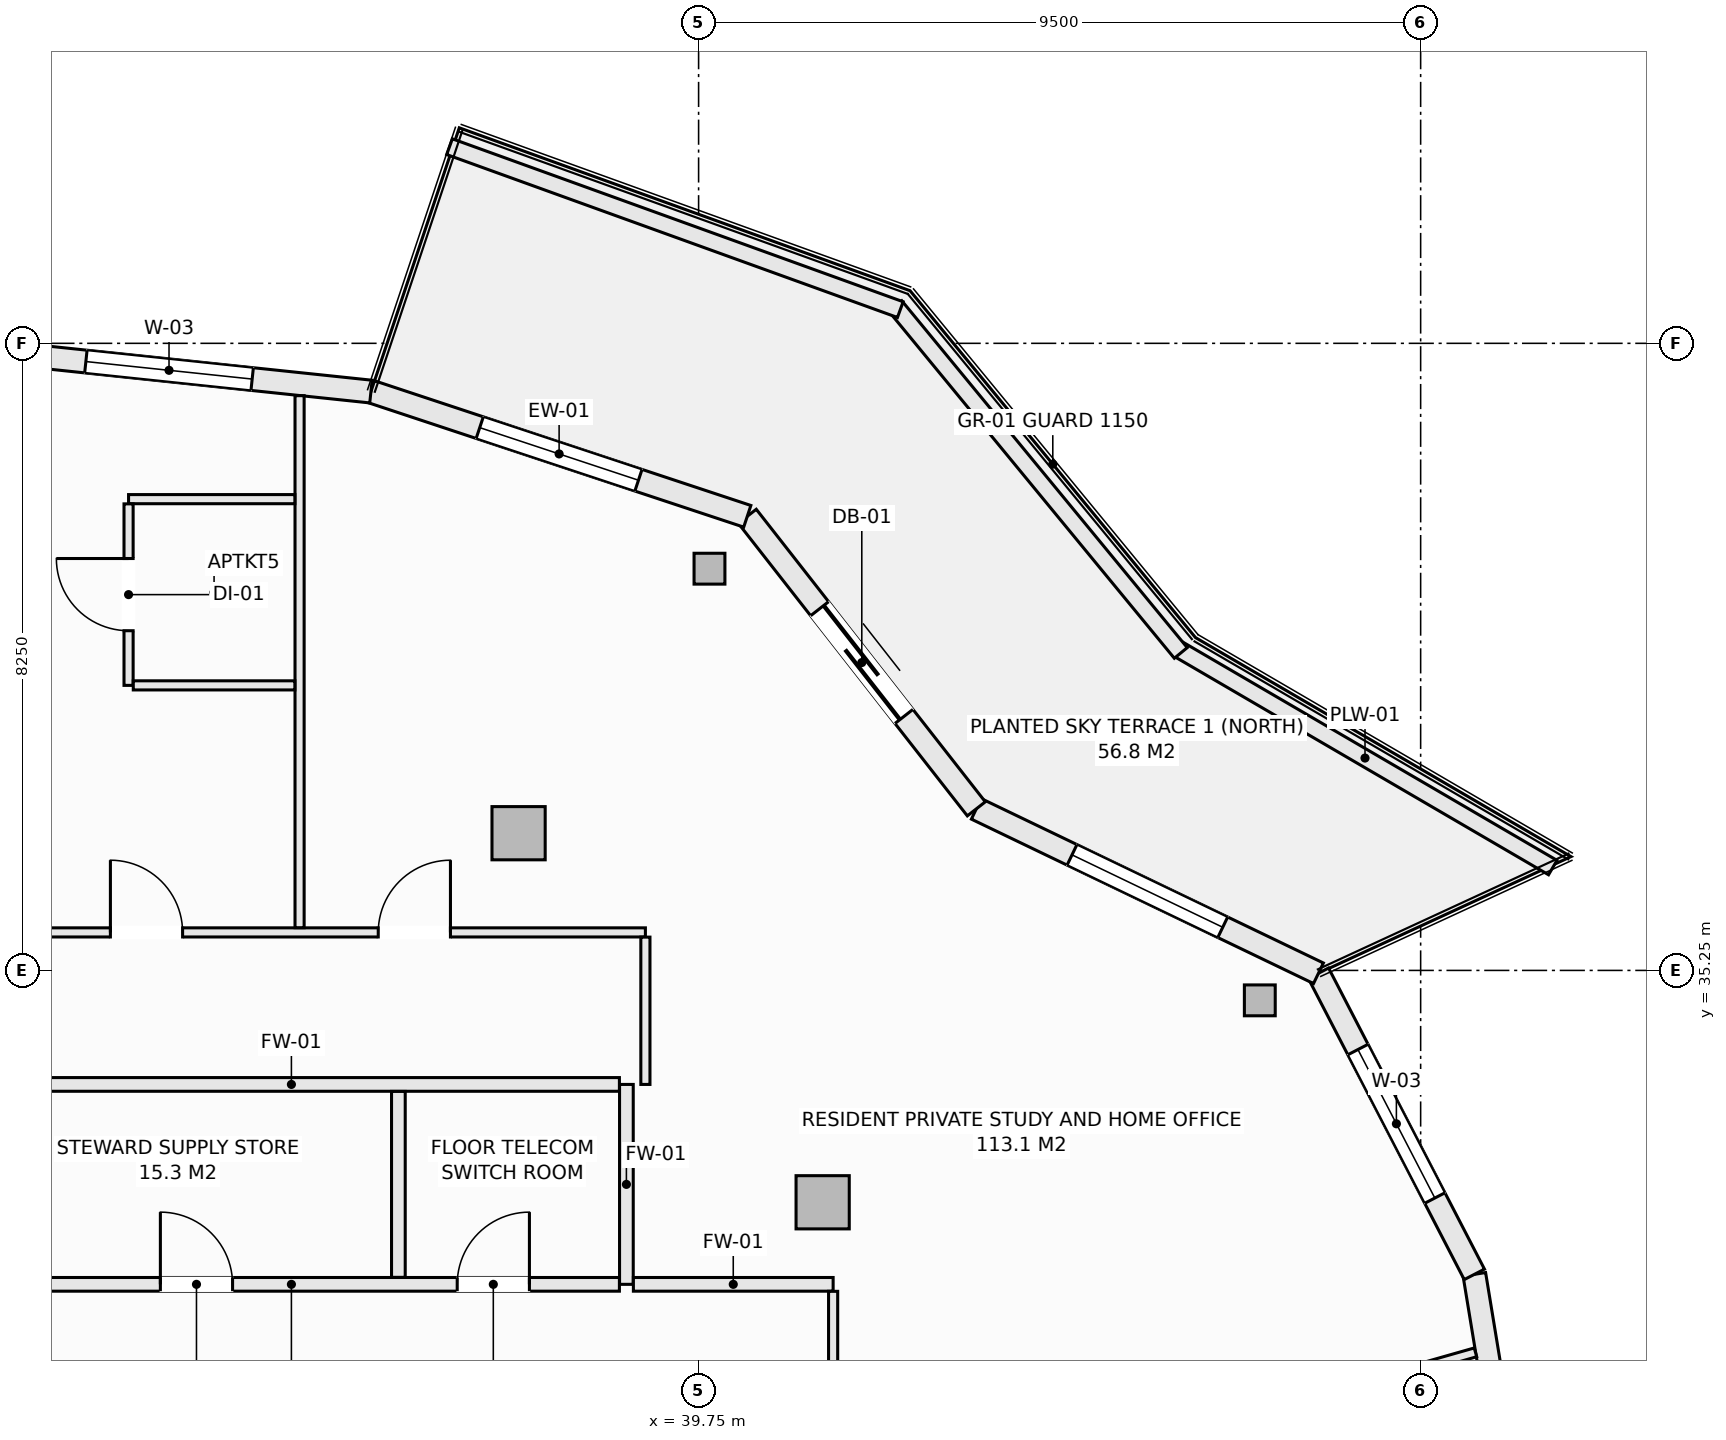
"""IFC4 building model, lengths in metres.
Left out: names, types, materials, properties, quantities, classifications, styles, units other than length and angle.
Written with IfcOpenShell. Run it as: python <this file> out.ifc"""

import sys

from ifc_helpers import new_model, si_unit, direction, frame, frame_2d, origin, origin_2d, place, context, subcontext, project, spatial, rectangle, hollow_rectangle, extrude, element, fill, save


model = new_model("IFC4")
c1 = context("Model", 3, precision=1e-05, world=origin(), true_north=direction((0.0, 1.0)))
c2 = subcontext(c1, "Body", "Model", "MODEL_VIEW")
j1 = project(units=[si_unit("LENGTHUNIT", "METRE"), si_unit("PLANEANGLEUNIT", "RADIAN")], contexts=[c1])
p1 = place(None, origin())
s1 = spatial("IfcSite", under=j1, at=p1, CompositionType="ELEMENT")
p2 = place(p1, origin())
s2 = spatial("IfcBuilding", under=s1, at=p2, CompositionType="ELEMENT")
p3 = place(p2, frame((0.0, 0.0, 265.7)))
s3 = spatial("IfcBuildingStorey", under=s2, at=p3, CompositionType="ELEMENT", Elevation=265.7)
for number, where, z_axis, x_axis in (
    (1, (47.134, 34.856, -0.27), (0.0, 0.0, 1.0), (1.0, 0.0, 0.0)),
    (2, (39.893, 40.535, -0.27), (0.0, 0.0, 1.0), (1.0, 0.0, 0.0)),
):
    element("IfcColumn", number, at=place(p3, frame(where, z_axis=z_axis, x_axis=x_axis)), inside=s3, PredefinedType="COLUMN", context=c2, shape_type="SweptSolid", body=[
        extrude(hollow_rectangle(XDim=0.406, YDim=0.406, WallThickness=0.016, at=origin_2d()), origin(), (0.0, 0.0, 1.0), 3.3),
    ])
for number, where, z_axis, x_axis in (
    (3, (41.382, 32.199, -0.27), (0.0, 0.0, 1.0), (1.0, 0.0, 0.0)),
    (4, (37.382, 37.055, -0.27), (0.0, 0.0, 1.0), (1.0, 0.0, 0.0)),
):
    element("IfcColumn", number, at=place(p3, frame(where, z_axis=z_axis, x_axis=x_axis)), inside=s3, PredefinedType="COLUMN", context=c2, shape_type="SweptSolid", body=[
        extrude(rectangle(XDim=0.7, YDim=0.7, at=origin_2d()), origin(), (0.0, 0.0, 1.0), 3.3),
    ])
p4 = place(p3, frame((49.957, 31.251, 0.0), z_axis=(0.0, 0.0, 1.0), x_axis=(0.162404622434, -0.98672424649, 0.0)))
e5 = element("IfcWall", 5, at=p4, inside=s3, PredefinedType="SOLIDWALL", context=c2, shape_type="SweptSolid", body=[
    extrude(rectangle(XDim=4.308, YDim=0.3, at=frame_2d((2.154, 0.0))), origin(), (0.0, 0.0, 1.0), 2.605),
])
p5 = place(p4, frame((1.554, 0.0, 0.72)))
e6 = element("IfcOpeningElement", 6, at=p5, cuts=e5, PredefinedType="OPENING", context=c2, shape_type="SweptSolid", body=[
    extrude(rectangle(XDim=1.2, YDim=1.65, at=frame_2d((0.6, 0.825))), frame((0.0, 0.16, 0.0), z_axis=(0.0, -1.0, 0.0), x_axis=(1.0, 0.0, 0.0)), (0.0, 0.0, 1.0), 0.32),
])
p6 = place(p3, frame((47.906, 35.212, 0.0), z_axis=(0.0, 0.0, 1.0), x_axis=(0.459801070243, -0.888021945564, 0.0)))
e7 = element("IfcWall", 7, at=p6, inside=s3, PredefinedType="SOLIDWALL", context=c2, shape_type="SweptSolid", body=[
    extrude(rectangle(XDim=4.461, YDim=0.3, at=frame_2d((2.23, 0.0))), origin(), (0.0, 0.0, 1.0), 2.605),
])
p7 = place(p6, frame((1.13, 0.0, 0.72)))
e8 = element("IfcOpeningElement", 8, at=p7, cuts=e7, PredefinedType="OPENING", context=c2, shape_type="SweptSolid", body=[
    extrude(rectangle(XDim=2.2, YDim=1.65, at=frame_2d((1.1, 0.825))), frame((0.0, 0.16, 0.0), z_axis=(0.0, -1.0, 0.0), x_axis=(1.0, 0.0, 0.0)), (0.0, 0.0, 1.0), 0.32),
])
p8 = place(p3, frame((43.404, 37.375, 0.0), z_axis=(0.0, 0.0, 1.0), x_axis=(0.901346013132, -0.433099716706, 0.0)))
e9 = element("IfcWall", 9, at=p8, inside=s3, PredefinedType="SOLIDWALL", context=c2, shape_type="SweptSolid", body=[
    extrude(rectangle(XDim=4.994, YDim=0.3, at=frame_2d((2.497, 0.0))), origin(), (0.0, 0.0, 1.0), 2.605),
])
p9 = place(p8, frame((1.397, 0.0, 0.72)))
e10 = element("IfcOpeningElement", 10, at=p9, cuts=e9, PredefinedType="OPENING", context=c2, shape_type="SweptSolid", body=[
    extrude(rectangle(XDim=2.2, YDim=1.65, at=frame_2d((1.1, 0.825))), frame((0.0, 0.16, 0.0), z_axis=(0.0, -1.0, 0.0), x_axis=(1.0, 0.0, 0.0)), (0.0, 0.0, 1.0), 0.32),
])
p10 = place(p3, frame((40.391, 41.225, 0.0), z_axis=(0.0, 0.0, 1.0), x_axis=(0.616413297421, -0.78742278781, 0.0)))
e11 = element("IfcWall", 11, at=p10, inside=s3, PredefinedType="SOLIDWALL", context=c2, shape_type="SweptSolid", body=[
    extrude(rectangle(XDim=4.888, YDim=0.3, at=frame_2d((2.444, 0.0))), origin(), (0.0, 0.0, 1.0), 2.605),
])
p11 = place(p10, frame((1.544, 0.0, 0.0)))
e12 = element("IfcOpeningElement", 12, at=p11, cuts=e11, PredefinedType="OPENING", context=c2, shape_type="SweptSolid", body=[
    extrude(rectangle(XDim=1.8, YDim=2.25, at=frame_2d((0.9, 1.125))), frame((0.0, 0.16, 0.0), z_axis=(0.0, -1.0, 0.0), x_axis=(1.0, 0.0, 0.0)), (0.0, 0.0, 1.0), 0.32),
])
p12 = place(p3, frame((35.439, 42.865, 0.0), z_axis=(0.0, 0.0, 1.0), x_axis=(0.949252744709, -0.314514271001, 0.0)))
e13 = element("IfcWall", 13, at=p12, inside=s3, PredefinedType="SOLIDWALL", context=c2, shape_type="SweptSolid", body=[
    extrude(rectangle(XDim=5.216, YDim=0.3, at=frame_2d((2.608, 0.0))), origin(), (0.0, 0.0, 1.0), 2.605),
])
p13 = place(p12, frame((1.508, 0.0, 0.72)))
e14 = element("IfcOpeningElement", 14, at=p13, cuts=e13, PredefinedType="OPENING", context=c2, shape_type="SweptSolid", body=[
    extrude(rectangle(XDim=2.2, YDim=1.65, at=frame_2d((1.1, 0.825))), frame((0.0, 0.16, 0.0), z_axis=(0.0, -1.0, 0.0), x_axis=(1.0, 0.0, 0.0)), (0.0, 0.0, 1.0), 0.32),
])
p14 = place(p3, frame((30.125, 43.425, 0.0), z_axis=(0.0, 0.0, 1.0), x_axis=(0.9944966869, -0.104768028258, 0.0)))
e15 = element("IfcWall", 15, at=p14, inside=s3, PredefinedType="SOLIDWALL", context=c2, shape_type="SweptSolid", body=[
    extrude(rectangle(XDim=5.343, YDim=0.3, at=frame_2d((2.672, 0.0))), origin(), (0.0, 0.0, 1.0), 2.605),
])
p15 = place(p14, frame((1.572, 0.0, 0.72)))
e16 = element("IfcOpeningElement", 16, at=p15, cuts=e15, PredefinedType="OPENING", context=c2, shape_type="SweptSolid", body=[
    extrude(rectangle(XDim=2.2, YDim=1.65, at=frame_2d((1.1, 0.825))), frame((0.0, 0.16, 0.0), z_axis=(0.0, -1.0, 0.0), x_axis=(1.0, 0.0, 0.0)), (0.0, 0.0, 1.0), 0.32),
])
p16 = place(p3, frame((46.048, 39.485, 0.0), z_axis=(0.0, 0.0, 1.0), x_axis=(0.863803671285, -0.503828559606, 0.0)))
e17 = element("IfcWall", 17, at=p16, inside=s3, PredefinedType="PARAPET", context=c2, shape_type="SweptSolid", body=[
    extrude(rectangle(XDim=5.719, YDim=0.22, at=frame_2d((2.86, 0.0))), origin(), (0.0, 0.0, 1.0), 0.52),
])
p17 = place(p3, frame((42.339, 43.99, 0.0), z_axis=(0.0, 0.0, 1.0), x_axis=(0.635450933862, -0.772141250455, 0.0)))
e18 = element("IfcWall", 18, at=p17, inside=s3, PredefinedType="PARAPET", context=c2, shape_type="SweptSolid", body=[
    extrude(rectangle(XDim=5.91, YDim=0.22, at=frame_2d((2.955, 0.0))), origin(), (0.0, 0.0, 1.0), 0.52),
])
p18 = place(p3, frame((36.473, 46.087, 0.0), z_axis=(0.0, 0.0, 1.0), x_axis=(0.940465240036, -0.339889882585, 0.0)))
e19 = element("IfcWall", 19, at=p18, inside=s3, PredefinedType="PARAPET", context=c2, shape_type="SweptSolid", body=[
    extrude(rectangle(XDim=6.307, YDim=0.22, at=frame_2d((3.153, 0.0))), origin(), (0.0, 0.0, 1.0), 0.52),
])
p19 = place(p3, frame((38.8, 31.12, 0.0), z_axis=(0.0, 0.0, 1.0), x_axis=(0.0, 1.0, 0.0)))
e20 = element("IfcWall", 20, at=p19, inside=s3, PredefinedType="SOLIDWALL", context=c2, shape_type="SweptSolid", body=[
    extrude(rectangle(XDim=2.63, YDim=0.18, at=frame_2d((1.315, 0.0))), origin(), (0.0, 0.0, 1.0), 3.03),
])
p20 = place(p3, frame((30.077, 31.12, 0.0), z_axis=(0.0, 0.0, 1.0), x_axis=(1.0, 0.0, 0.0)))
e21 = element("IfcWall", 21, at=p20, inside=s3, PredefinedType="SOLIDWALL", context=c2, shape_type="SweptSolid", body=[
    extrude(rectangle(XDim=8.631, YDim=0.18, at=frame_2d((4.315, 0.0))), origin(), (0.0, 0.0, 1.0), 3.03),
])
p21 = place(p20, frame((2.592, 0.0, 0.0)))
e22 = element("IfcOpeningElement", 22, at=p21, cuts=e21, PredefinedType="OPENING", context=c2, shape_type="SweptSolid", body=[
    extrude(rectangle(XDim=0.95, YDim=2.1, at=frame_2d((0.475, 1.05))), frame((0.0, 0.1, 0.0), z_axis=(0.0, -1.0, 0.0), x_axis=(1.0, 0.0, 0.0)), (0.0, 0.0, 1.0), 0.2),
])
p22 = place(p20, frame((6.497, 0.0, 0.0)))
e23 = element("IfcOpeningElement", 23, at=p22, cuts=e21, PredefinedType="OPENING", context=c2, shape_type="SweptSolid", body=[
    extrude(rectangle(XDim=0.95, YDim=2.1, at=frame_2d((0.475, 1.05))), frame((0.0, 0.1, 0.0), z_axis=(0.0, -1.0, 0.0), x_axis=(1.0, 0.0, 0.0)), (0.0, 0.0, 1.0), 0.2),
])
p23 = place(p3, frame((38.892, 31.12, 0.0), z_axis=(0.0, 0.0, 1.0), x_axis=(1.0, 0.0, 0.0)))
e24 = element("IfcWall", 24, at=p23, inside=s3, PredefinedType="SOLIDWALL", context=c2, shape_type="SweptSolid", body=[
    extrude(rectangle(XDim=2.628, YDim=0.18, at=frame_2d((1.314, 0.0))), origin(), (0.0, 0.0, 1.0), 3.03),
])
p24 = place(p3, frame((30.077, 33.75, 0.0), z_axis=(0.0, 0.0, 1.0), x_axis=(1.0, 0.0, 0.0)))
e25 = element("IfcWall", 25, at=p24, inside=s3, PredefinedType="SOLIDWALL", context=c2, shape_type="SweptSolid", body=[
    extrude(rectangle(XDim=8.631, YDim=0.18, at=frame_2d((4.315, 0.0))), origin(), (0.0, 0.0, 1.0), 3.03),
])
p25 = place(p3, frame((35.8, 31.212, 0.0), z_axis=(0.0, 0.0, 1.0), x_axis=(0.0, 1.0, 0.0)))
e26 = element("IfcWall", 26, at=p25, inside=s3, PredefinedType="SOLIDWALL", context=c2, shape_type="SweptSolid", body=[
    extrude(rectangle(XDim=2.446, YDim=0.18, at=frame_2d((1.223, 0.0))), origin(), (0.0, 0.0, 1.0), 3.03),
])
p26 = place(p3, frame((30.062, 35.75, 0.0), z_axis=(0.0, 0.0, 1.0), x_axis=(1.0, 0.0, 0.0)))
e27 = element("IfcWall", 27, at=p26, inside=s3, PredefinedType="PARTITIONING", context=c2, shape_type="SweptSolid", body=[
    extrude(rectangle(XDim=8.988, YDim=0.12, at=frame_2d((4.494, 0.0))), origin(), (0.0, 0.0, 1.0), 2.478),
])
p27 = place(p26, frame((5.473, 0.0, 0.0)))
e28 = element("IfcOpeningElement", 28, at=p27, cuts=e27, PredefinedType="OPENING", context=c2, shape_type="SweptSolid", body=[
    extrude(rectangle(XDim=0.95, YDim=2.1, at=frame_2d((0.475, 1.05))), frame((0.0, 0.07, 0.0), z_axis=(0.0, -1.0, 0.0), x_axis=(1.0, 0.0, 0.0)), (0.0, 0.0, 1.0), 0.14),
])
p28 = place(p26, frame((1.949, 0.0, 0.0)))
e29 = element("IfcOpeningElement", 29, at=p28, cuts=e27, PredefinedType="OPENING", context=c2, shape_type="SweptSolid", body=[
    extrude(rectangle(XDim=0.95, YDim=2.1, at=frame_2d((0.475, 1.05))), frame((0.0, 0.07, 0.0), z_axis=(0.0, -1.0, 0.0), x_axis=(1.0, 0.0, 0.0)), (0.0, 0.0, 1.0), 0.14),
])
p29 = place(p3, frame((39.05, 33.75, 0.0), z_axis=(0.0, 0.0, 1.0), x_axis=(0.0, 1.0, 0.0)))
e30 = element("IfcWall", 30, at=p29, inside=s3, PredefinedType="PARTITIONING", context=c2, shape_type="SweptSolid", body=[
    extrude(rectangle(XDim=1.938, YDim=0.12, at=frame_2d((0.969, 0.0))), origin(), (0.0, 0.0, 1.0), 3.03),
])
p30 = place(p3, frame((41.52, 23.02, 0.0), z_axis=(0.0, 0.0, 1.0), x_axis=(0.0, 1.0, 0.0)))
e31 = element("IfcWall", 31, at=p30, inside=s3, PredefinedType="PARTITIONING", context=c2, shape_type="SweptSolid", body=[
    extrude(rectangle(XDim=8.008, YDim=0.12, at=frame_2d((4.004, 0.0))), origin(), (0.0, 0.0, 1.0), 2.478),
])
p31 = place(p30, frame((2.135, 0.0, 0.0)))
e32 = element("IfcOpeningElement", 32, at=p31, cuts=e31, PredefinedType="OPENING", context=c2, shape_type="SweptSolid", body=[
    extrude(rectangle(XDim=0.95, YDim=2.1, at=frame_2d((0.475, 1.05))), frame((0.0, 0.07, 0.0), z_axis=(0.0, -1.0, 0.0), x_axis=(1.0, 0.0, 0.0)), (0.0, 0.0, 1.0), 0.14),
])
p32 = place(p3, frame((34.5, 35.812, 0.0), z_axis=(0.0, 0.0, 1.0), x_axis=(0.0, 1.0, 0.0)))
e33 = element("IfcWall", 33, at=p32, inside=s3, PredefinedType="PARTITIONING", context=c2, shape_type="SweptSolid", body=[
    extrude(rectangle(XDim=6.999, YDim=0.12, at=frame_2d((3.5, 0.0))), origin(), (0.0, 0.0, 1.0), 2.77),
])
p33 = place(p3, frame((41.582, 27.838, 0.0), z_axis=(0.0, 0.0, 1.0), x_axis=(0.961811765236, 0.273711761262, 0.0)))
e34 = element("IfcWall", 34, at=p33, inside=s3, PredefinedType="PARTITIONING", context=c2, shape_type="SweptSolid", body=[
    extrude(rectangle(XDim=8.722, YDim=0.12, at=frame_2d((4.361, 0.0))), origin(), (0.0, 0.0, 1.0), 3.03),
])
p34 = place(p3, frame((32.25, 41.45, 0.0), z_axis=(0.0, 0.0, 1.0), x_axis=(1.0, 0.0, 0.0)))
e35 = element("IfcWall", 35, at=p34, inside=s3, PredefinedType="PARTITIONING", context=c2, shape_type="SweptSolid", body=[
    extrude(rectangle(XDim=2.188, YDim=0.12, at=frame_2d((1.094, 0.0))), origin(), (0.0, 0.0, 1.0), 3.03),
])
p35 = place(p3, frame((32.25, 39.0, 0.0), z_axis=(0.0, 0.0, 1.0), x_axis=(0.0, 1.0, 0.0)))
e36 = element("IfcWall", 36, at=p35, inside=s3, PredefinedType="PARTITIONING", context=c2, shape_type="SweptSolid", body=[
    extrude(rectangle(XDim=2.388, YDim=0.12, at=frame_2d((1.194, 0.0))), origin(), (0.0, 0.0, 1.0), 3.03),
])
p36 = place(p35, frame((0.719, 0.0, 0.0)))
e37 = element("IfcOpeningElement", 37, at=p36, cuts=e36, PredefinedType="OPENING", context=c2, shape_type="SweptSolid", body=[
    extrude(rectangle(XDim=0.95, YDim=2.1, at=frame_2d((0.475, 1.05))), frame((0.0, 0.07, 0.0), z_axis=(0.0, -1.0, 0.0), x_axis=(1.0, 0.0, 0.0)), (0.0, 0.0, 1.0), 0.14),
])
p37 = place(p3, frame((32.312, 39.0, 0.0), z_axis=(0.0, 0.0, 1.0), x_axis=(1.0, 0.0, 0.0)))
e38 = element("IfcWall", 38, at=p37, inside=s3, PredefinedType="PARTITIONING", context=c2, shape_type="SweptSolid", body=[
    extrude(rectangle(XDim=2.126, YDim=0.12, at=frame_2d((1.063, 0.0))), origin(), (0.0, 0.0, 1.0), 3.03),
])
p38 = place(p7, origin())
e39 = element("IfcWindow", 39, at=p38, inside=s3, PartitioningType="SINGLE_PANEL", PredefinedType="WINDOW", context=c2, shape_type="SweptSolid", body=[
    extrude(rectangle(XDim=2.2, YDim=1.65, at=frame_2d((1.1, 0.825))), frame((0.0, 0.03, 0.0), z_axis=(0.0, -1.0, 0.0), x_axis=(1.0, 0.0, 0.0)), (0.0, 0.0, 1.0), 0.06),
])
fill(e8, e39)
p39 = place(p9, origin())
e40 = element("IfcWindow", 40, at=p39, inside=s3, PartitioningType="SINGLE_PANEL", PredefinedType="WINDOW", context=c2, shape_type="SweptSolid", body=[
    extrude(rectangle(XDim=2.2, YDim=1.65, at=frame_2d((1.1, 0.825))), frame((0.0, 0.03, 0.0), z_axis=(0.0, -1.0, 0.0), x_axis=(1.0, 0.0, 0.0)), (0.0, 0.0, 1.0), 0.06),
])
fill(e10, e40)
p40 = place(p11, origin())
e41 = element("IfcDoor", 41, at=p40, inside=s3, OperationType="SLIDING_TO_LEFT", PredefinedType="DOOR", context=c2, shape_type="SweptSolid", body=[
    extrude(rectangle(XDim=1.8, YDim=2.25, at=frame_2d((0.9, 1.125))), frame((0.0, 0.025, 0.0), z_axis=(0.0, -1.0, 0.0), x_axis=(1.0, 0.0, 0.0)), (0.0, 0.0, 1.0), 0.05),
])
fill(e12, e41)
p41 = place(p13, origin())
e42 = element("IfcWindow", 42, at=p41, inside=s3, PartitioningType="SINGLE_PANEL", PredefinedType="WINDOW", context=c2, shape_type="SweptSolid", body=[
    extrude(rectangle(XDim=2.2, YDim=1.65, at=frame_2d((1.1, 0.825))), frame((0.0, 0.03, 0.0), z_axis=(0.0, -1.0, 0.0), x_axis=(1.0, 0.0, 0.0)), (0.0, 0.0, 1.0), 0.06),
])
fill(e14, e42)
p42 = place(p15, origin())
e43 = element("IfcWindow", 43, at=p42, inside=s3, PartitioningType="SINGLE_PANEL", PredefinedType="WINDOW", context=c2, shape_type="SweptSolid", body=[
    extrude(rectangle(XDim=2.2, YDim=1.65, at=frame_2d((1.1, 0.825))), frame((0.0, 0.03, 0.0), z_axis=(0.0, -1.0, 0.0), x_axis=(1.0, 0.0, 0.0)), (0.0, 0.0, 1.0), 0.06),
])
fill(e16, e43)
p43 = place(p21, origin())
e44 = element("IfcDoor", 44, at=p43, inside=s3, OperationType="SINGLE_SWING_LEFT", PredefinedType="DOOR", context=c2, shape_type="SweptSolid", body=[
    extrude(rectangle(XDim=0.95, YDim=2.1, at=frame_2d((0.475, 1.05))), frame((0.0, 0.025, 0.0), z_axis=(0.0, -1.0, 0.0), x_axis=(1.0, 0.0, 0.0)), (0.0, 0.0, 1.0), 0.05),
])
fill(e22, e44)
p44 = place(p22, origin())
e45 = element("IfcDoor", 45, at=p44, inside=s3, OperationType="SINGLE_SWING_RIGHT", PredefinedType="DOOR", context=c2, shape_type="SweptSolid", body=[
    extrude(rectangle(XDim=0.95, YDim=2.1, at=frame_2d((0.475, 1.05))), frame((0.0, 0.025, 0.0), z_axis=(0.0, -1.0, 0.0), x_axis=(1.0, 0.0, 0.0)), (0.0, 0.0, 1.0), 0.05),
])
fill(e23, e45)
p45 = place(p27, origin())
e46 = element("IfcDoor", 46, at=p45, inside=s3, OperationType="SINGLE_SWING_RIGHT", PredefinedType="DOOR", context=c2, shape_type="SweptSolid", body=[
    extrude(rectangle(XDim=0.95, YDim=2.1, at=frame_2d((0.475, 1.05))), frame((0.0, 0.025, 0.0), z_axis=(0.0, -1.0, 0.0), x_axis=(1.0, 0.0, 0.0)), (0.0, 0.0, 1.0), 0.05),
])
fill(e28, e46)
p46 = place(p28, origin())
e47 = element("IfcDoor", 47, at=p46, inside=s3, OperationType="SINGLE_SWING_LEFT", PredefinedType="DOOR", context=c2, shape_type="SweptSolid", body=[
    extrude(rectangle(XDim=0.95, YDim=2.1, at=frame_2d((0.475, 1.05))), frame((0.0, 0.025, 0.0), z_axis=(0.0, -1.0, 0.0), x_axis=(1.0, 0.0, 0.0)), (0.0, 0.0, 1.0), 0.05),
])
fill(e29, e47)
p47 = place(p36, origin())
e48 = element("IfcDoor", 48, at=p47, inside=s3, OperationType="SINGLE_SWING_RIGHT", PredefinedType="DOOR", context=c2, shape_type="SweptSolid", body=[
    extrude(rectangle(XDim=0.95, YDim=2.1, at=frame_2d((0.475, 1.05))), frame((0.0, 0.025, 0.0), z_axis=(0.0, -1.0, 0.0), x_axis=(1.0, 0.0, 0.0)), (0.0, 0.0, 1.0), 0.05),
])
fill(e37, e48)
save(model, sys.argv[1])
